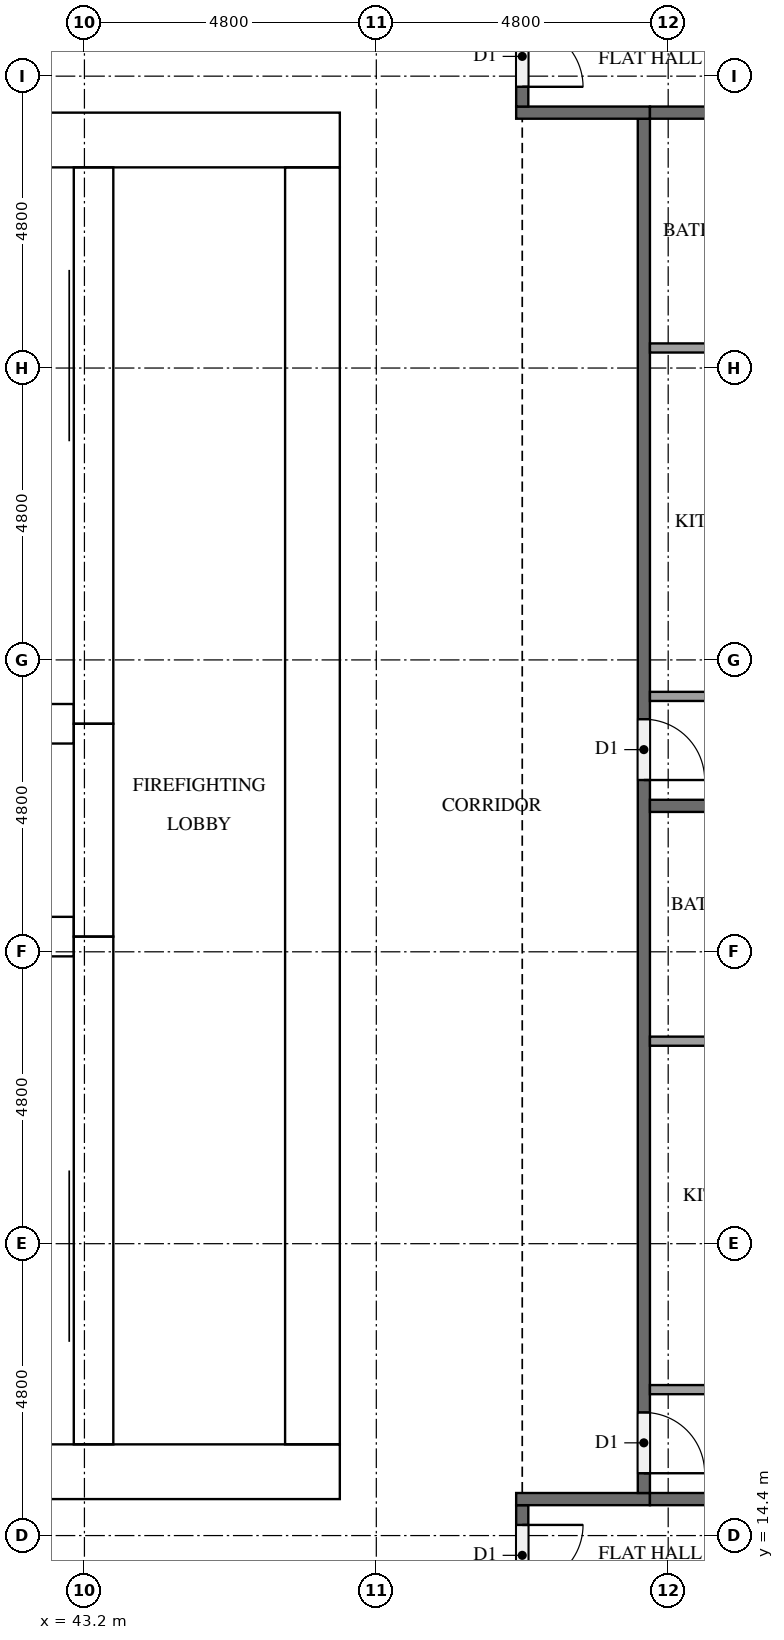
"""IFC4 building model, lengths in metres.
Left out: names, types, materials, properties, quantities, classifications, styles, units other than length and angle.
Written with IfcOpenShell. Run it as: python <this file> out.ifc"""

import sys

from ifc_helpers import new_model, si_unit, direction, frame, frame_2d, origin, place, context, subcontext, project, spatial, rectangle, extrude, element, fill, save


model = new_model("IFC4")
c1 = context("Model", 3, precision=1e-05, world=origin(), true_north=direction((0.0, 1.0)))
c2 = subcontext(c1, "Body", "Model", "MODEL_VIEW")
j1 = project(units=[si_unit("LENGTHUNIT", "METRE"), si_unit("PLANEANGLEUNIT", "RADIAN")], contexts=[c1])
p1 = place(None, origin())
s1 = spatial("IfcSite", under=j1, at=p1, CompositionType="ELEMENT")
p2 = place(p1, origin())
s2 = spatial("IfcBuilding", under=s1, at=p2, CompositionType="ELEMENT")
p3 = place(p2, frame((0.0, 0.0, 110.2)))
s3 = spatial("IfcBuildingStorey", under=s2, at=p3, CompositionType="ELEMENT", Elevation=110.2)
p4 = place(p3, frame((15.0, 15.45, 0.0), z_axis=(0.0, 0.0, 1.0), x_axis=(1.0, 0.0, 0.0)))
e1 = element("IfcWall", 1, at=p4, inside=s3, PredefinedType="SHEAR", context=c2, shape_type="SweptSolid", body=[
    extrude(rectangle(XDim=32.4, YDim=0.9, at=frame_2d((16.2, 0.0))), origin(), (0.0, 0.0, 1.0), 3.1),
])
p5 = place(p4, frame((15.3, 0.0, 0.0)))
e2 = element("IfcOpeningElement", 2, at=p5, cuts=e1, PredefinedType="OPENING", context=c2, shape_type="SweptSolid", body=[
    extrude(rectangle(XDim=1.8, YDim=2.1, at=frame_2d((0.9, 1.05))), frame((0.0, 0.46, 0.0), z_axis=(0.0, -1.0, 0.0), x_axis=(1.0, 0.0, 0.0)), (0.0, 0.0, 1.0), 0.92),
])
p6 = place(p3, frame((15.0, 37.35, 0.0), z_axis=(0.0, 0.0, 1.0), x_axis=(1.0, 0.0, 0.0)))
e3 = element("IfcWall", 3, at=p6, inside=s3, PredefinedType="SHEAR", context=c2, shape_type="SweptSolid", body=[
    extrude(rectangle(XDim=32.4, YDim=0.9, at=frame_2d((16.2, 0.0))), origin(), (0.0, 0.0, 1.0), 3.1),
])
p7 = place(p6, frame((15.3, 0.0, 0.0)))
e4 = element("IfcOpeningElement", 4, at=p7, cuts=e3, PredefinedType="OPENING", context=c2, shape_type="SweptSolid", body=[
    extrude(rectangle(XDim=1.8, YDim=2.1, at=frame_2d((0.9, 1.05))), frame((0.0, 0.46, 0.0), z_axis=(0.0, -1.0, 0.0), x_axis=(1.0, 0.0, 0.0)), (0.0, 0.0, 1.0), 0.92),
])
p8 = place(p6, frame((1.794, 0.0, 0.0)))
e5 = element("IfcOpeningElement", 5, at=p8, cuts=e3, PredefinedType="OPENING", context=c2, shape_type="SweptSolid", body=[
    extrude(rectangle(XDim=1.0, YDim=2.1, at=frame_2d((0.5, 1.05))), frame((0.0, 0.46, 0.0), z_axis=(0.0, -1.0, 0.0), x_axis=(1.0, 0.0, 0.0)), (0.0, 0.0, 1.0), 0.92),
])
p9 = place(p6, frame((5.331, 0.0, 0.0)))
e6 = element("IfcOpeningElement", 6, at=p9, cuts=e3, PredefinedType="OPENING", context=c2, shape_type="SweptSolid", body=[
    extrude(rectangle(XDim=1.0, YDim=2.1, at=frame_2d((0.5, 1.05))), frame((0.0, 0.46, 0.0), z_axis=(0.0, -1.0, 0.0), x_axis=(1.0, 0.0, 0.0)), (0.0, 0.0, 1.0), 0.92),
])
p10 = place(p3, frame((46.95, 15.9, 0.0), z_axis=(0.0, 0.0, 1.0), x_axis=(0.0, 1.0, 0.0)))
e7 = element("IfcWall", 7, at=p10, inside=s3, PredefinedType="SHEAR", context=c2, shape_type="SweptSolid", body=[
    extrude(rectangle(XDim=21.0, YDim=0.9, at=frame_2d((10.5, 0.0))), origin(), (0.0, 0.0, 1.0), 3.1),
])
p11 = place(p10, frame((10.2, 0.0, 0.0)))
e8 = element("IfcOpeningElement", 8, at=p11, cuts=e7, PredefinedType="OPENING", context=c2, shape_type="SweptSolid", body=[
    extrude(rectangle(XDim=1.2, YDim=2.1, at=frame_2d((0.6, 1.05))), frame((0.0, 0.46, 0.0), z_axis=(0.0, -1.0, 0.0), x_axis=(1.0, 0.0, 0.0)), (0.0, 0.0, 1.0), 0.92),
])
p12 = place(p3, frame((43.35, 15.9, 0.0), z_axis=(0.0, 0.0, 1.0), x_axis=(0.0, 1.0, 0.0)))
e9 = element("IfcWall", 9, at=p12, inside=s3, PredefinedType="SHEAR", context=c2, shape_type="SweptSolid", body=[
    extrude(rectangle(XDim=8.35, YDim=0.65, at=frame_2d((4.175, 0.0))), origin(), (0.0, 0.0, 1.0), 3.1),
])
p13 = place(p12, frame((0.3, 0.0, 0.0)))
e10 = element("IfcOpeningElement", 10, at=p13, cuts=e9, PredefinedType="OPENING", context=c2, shape_type="SweptSolid", body=[
    extrude(rectangle(XDim=1.2, YDim=2.1, at=frame_2d((0.6, 1.05))), frame((0.0, 0.335, 0.0), z_axis=(0.0, -1.0, 0.0), x_axis=(1.0, 0.0, 0.0)), (0.0, 0.0, 1.0), 0.67),
])
p14 = place(p3, frame((43.35, 24.25, 0.0), z_axis=(0.0, 0.0, 1.0), x_axis=(0.0, 1.0, 0.0)))
e11 = element("IfcWall", 11, at=p14, inside=s3, PredefinedType="SHEAR", context=c2, shape_type="SweptSolid", body=[
    extrude(rectangle(XDim=3.5, YDim=0.65, at=frame_2d((1.75, 0.0))), origin(), (0.0, 0.0, 1.0), 3.1),
])
p15 = place(p14, frame((1.2, 0.0, 0.0)))
e12 = element("IfcOpeningElement", 12, at=p15, cuts=e11, PredefinedType="OPENING", context=c2, shape_type="SweptSolid", body=[
    extrude(rectangle(XDim=1.1, YDim=2.1, at=frame_2d((0.55, 1.05))), frame((0.0, 0.335, 0.0), z_axis=(0.0, -1.0, 0.0), x_axis=(1.0, 0.0, 0.0)), (0.0, 0.0, 1.0), 0.67),
])
p16 = place(p3, frame((43.35, 27.75, 0.0), z_axis=(0.0, 0.0, 1.0), x_axis=(0.0, 1.0, 0.0)))
e13 = element("IfcWall", 13, at=p16, inside=s3, PredefinedType="SHEAR", context=c2, shape_type="SweptSolid", body=[
    extrude(rectangle(XDim=9.15, YDim=0.65, at=frame_2d((4.575, 0.0))), origin(), (0.0, 0.0, 1.0), 3.1),
])
p17 = place(p16, frame((7.65, 0.0, 0.0)))
e14 = element("IfcOpeningElement", 14, at=p17, cuts=e13, PredefinedType="OPENING", context=c2, shape_type="SweptSolid", body=[
    extrude(rectangle(XDim=1.2, YDim=2.1, at=frame_2d((0.6, 1.05))), frame((0.0, 0.335, 0.0), z_axis=(0.0, -1.0, 0.0), x_axis=(1.0, 0.0, 0.0)), (0.0, 0.0, 1.0), 0.67),
])
for number, where, z_axis, x_axis in (
    (15, (39.625, 24.25, 0.0), (0.0, 0.0, 1.0), (1.0, 0.0, 0.0)),
    (16, (39.625, 27.75, 0.0), (0.0, 0.0, 1.0), (1.0, 0.0, 0.0)),
):
    element("IfcWall", number, at=place(p3, frame(where, z_axis=z_axis, x_axis=x_axis)), inside=s3, PredefinedType="SHEAR", context=c2, shape_type="SweptSolid", body=[
        extrude(rectangle(XDim=3.4, YDim=0.65, at=frame_2d((1.7, 0.0))), origin(), (0.0, 0.0, 1.0), 3.1),
    ])
p18 = place(p3, frame((50.4, 14.9, 0.0), z_axis=(0.0, 0.0, 1.0), x_axis=(0.0, -1.0, 0.0)))
e17 = element("IfcWall", 17, at=p18, inside=s3, PredefinedType="PARTITIONING", context=c2, shape_type="SweptSolid", body=[
    extrude(rectangle(XDim=2.8, YDim=0.2, at=frame_2d((1.4, 0.0))), origin(), (0.0, 0.0, 1.0), 3.1),
])
p19 = place(p18, frame((0.325, 0.0, 0.0)))
e18 = element("IfcOpeningElement", 18, at=p19, cuts=e17, PredefinedType="OPENING", context=c2, shape_type="SweptSolid", body=[
    extrude(rectangle(XDim=1.0, YDim=2.1, at=frame_2d((0.5, 1.05))), frame((0.0, 0.11, 0.0), z_axis=(0.0, -1.0, 0.0), x_axis=(1.0, 0.0, 0.0)), (0.0, 0.0, 1.0), 0.22),
])
p20 = place(p3, frame((50.3, 15.0, 0.0), z_axis=(0.0, 0.0, 1.0), x_axis=(1.0, 0.0, 0.0)))
e19 = element("IfcWall", 19, at=p20, inside=s3, PredefinedType="PARTITIONING", context=c2, shape_type="SweptSolid", body=[
    extrude(rectangle(XDim=2.2, YDim=0.2, at=frame_2d((1.1, 0.0))), origin(), (0.0, 0.0, 1.0), 3.1),
])
p21 = place(p3, frame((52.4, 37.7, 0.0), z_axis=(0.0, 0.0, 1.0), x_axis=(0.0, -1.0, 0.0)))
e20 = element("IfcWall", 20, at=p21, inside=s3, PredefinedType="PARTITIONING", context=c2, shape_type="SweptSolid", body=[
    extrude(rectangle(XDim=22.6, YDim=0.2, at=frame_2d((11.3, 0.0))), origin(), (0.0, 0.0, 1.0), 3.1),
])
p22 = place(p21, frame((21.275, 0.0, 0.0)))
e21 = element("IfcOpeningElement", 21, at=p22, cuts=e20, PredefinedType="OPENING", context=c2, shape_type="SweptSolid", body=[
    extrude(rectangle(XDim=1.0, YDim=2.1, at=frame_2d((0.5, 1.05))), frame((0.0, 0.11, 0.0), z_axis=(0.0, -1.0, 0.0), x_axis=(1.0, 0.0, 0.0)), (0.0, 0.0, 1.0), 0.22),
])
p23 = place(p21, frame((9.875, 0.0, 0.0)))
e22 = element("IfcOpeningElement", 22, at=p23, cuts=e20, PredefinedType="OPENING", context=c2, shape_type="SweptSolid", body=[
    extrude(rectangle(XDim=1.0, YDim=2.1, at=frame_2d((0.5, 1.05))), frame((0.0, 0.11, 0.0), z_axis=(0.0, -1.0, 0.0), x_axis=(1.0, 0.0, 0.0)), (0.0, 0.0, 1.0), 0.22),
])
p24 = place(p3, frame((52.5, 37.8, 0.0), z_axis=(0.0, 0.0, 1.0), x_axis=(-1.0, 0.0, 0.0)))
e23 = element("IfcWall", 23, at=p24, inside=s3, PredefinedType="PARTITIONING", context=c2, shape_type="SweptSolid", body=[
    extrude(rectangle(XDim=2.2, YDim=0.2, at=frame_2d((1.1, 0.0))), origin(), (0.0, 0.0, 1.0), 3.1),
])
p25 = place(p3, frame((50.4, 40.7, 0.0), z_axis=(0.0, 0.0, 1.0), x_axis=(0.0, -1.0, 0.0)))
e24 = element("IfcWall", 24, at=p25, inside=s3, PredefinedType="PARTITIONING", context=c2, shape_type="SweptSolid", body=[
    extrude(rectangle(XDim=2.8, YDim=0.2, at=frame_2d((1.4, 0.0))), origin(), (0.0, 0.0, 1.0), 3.1),
])
p26 = place(p25, frame((1.475, 0.0, 0.0)))
e25 = element("IfcOpeningElement", 25, at=p26, cuts=e24, PredefinedType="OPENING", context=c2, shape_type="SweptSolid", body=[
    extrude(rectangle(XDim=1.0, YDim=2.1, at=frame_2d((0.5, 1.05))), frame((0.0, 0.11, 0.0), z_axis=(0.0, -1.0, 0.0), x_axis=(1.0, 0.0, 0.0)), (0.0, 0.0, 1.0), 0.22),
])
for number, where, z_axis, x_axis in (
    (26, (52.5, 15.0, 0.0), (0.0, 0.0, 1.0), (1.0, 0.0, 0.0)),
    (27, (52.5, 26.4, 0.0), (0.0, 0.0, 1.0), (1.0, 0.0, 0.0)),
):
    element("IfcWall", number, at=place(p3, frame(where, z_axis=z_axis, x_axis=x_axis)), inside=s3, PredefinedType="PARTITIONING", context=c2, shape_type="SweptSolid", body=[
        extrude(rectangle(XDim=9.8, YDim=0.2, at=frame_2d((4.9, 0.0))), origin(), (0.0, 0.0, 1.0), 3.1),
    ])
p27 = place(p3, frame((52.5, 37.8, 0.0), z_axis=(0.0, 0.0, 1.0), x_axis=(1.0, 0.0, 0.0)))
e28 = element("IfcWall", 28, at=p27, inside=s3, PredefinedType="PARTITIONING", context=c2, shape_type="SweptSolid", body=[
    extrude(rectangle(XDim=9.475, YDim=0.2, at=frame_2d((4.738, 0.0))), origin(), (0.0, 0.0, 1.0), 3.1),
])
p28 = place(p3, frame((52.5, 22.53, 0.0), z_axis=(0.0, 0.0, 1.0), x_axis=(1.0, 0.0, 0.0)))
e29 = element("IfcWall", 29, at=p28, inside=s3, PredefinedType="PARTITIONING", context=c2, shape_type="SweptSolid", body=[
    extrude(rectangle(XDim=2.475, YDim=0.15, at=frame_2d((1.238, 0.0))), origin(), (0.0, 0.0, 1.0), 3.1),
])
p29 = place(p3, frame((52.5, 16.8, 0.0), z_axis=(0.0, 0.0, 1.0), x_axis=(1.0, 0.0, 0.0)))
e30 = element("IfcWall", 30, at=p29, inside=s3, PredefinedType="PARTITIONING", context=c2, shape_type="SweptSolid", body=[
    extrude(rectangle(XDim=2.625, YDim=0.15, at=frame_2d((1.312, 0.0))), origin(), (0.0, 0.0, 1.0), 3.1),
])
p30 = place(p3, frame((52.5, 33.93, 0.0), z_axis=(0.0, 0.0, 1.0), x_axis=(1.0, 0.0, 0.0)))
e31 = element("IfcWall", 31, at=p30, inside=s3, PredefinedType="PARTITIONING", context=c2, shape_type="SweptSolid", body=[
    extrude(rectangle(XDim=2.925, YDim=0.15, at=frame_2d((1.462, 0.0))), origin(), (0.0, 0.0, 1.0), 3.1),
])
p31 = place(p3, frame((52.5, 28.2, 0.0), z_axis=(0.0, 0.0, 1.0), x_axis=(1.0, 0.0, 0.0)))
e32 = element("IfcWall", 32, at=p31, inside=s3, PredefinedType="PARTITIONING", context=c2, shape_type="SweptSolid", body=[
    extrude(rectangle(XDim=3.075, YDim=0.15, at=frame_2d((1.538, 0.0))), origin(), (0.0, 0.0, 1.0), 3.1),
])
p32 = place(p15, origin())
e33 = element("IfcDoor", 33, at=p32, inside=s3, OperationType="DOUBLE_DOOR_SLIDING", PredefinedType="DOOR", context=c2, shape_type="SweptSolid", body=[
    extrude(rectangle(XDim=1.1, YDim=2.1, at=frame_2d((0.55, 1.05))), frame((0.0, 0.025, 0.0), z_axis=(0.0, -1.0, 0.0), x_axis=(1.0, 0.0, 0.0)), (0.0, 0.0, 1.0), 0.05),
])
fill(e12, e33)
p33 = place(p13, origin())
e34 = element("IfcDoor", 34, at=p33, inside=s3, OperationType="SINGLE_SWING_LEFT", PredefinedType="DOOR", context=c2, shape_type="SweptSolid", body=[
    extrude(rectangle(XDim=1.2, YDim=2.1, at=frame_2d((0.6, 1.05))), frame((0.0, 0.025, 0.0), z_axis=(0.0, -1.0, 0.0), x_axis=(1.0, 0.0, 0.0)), (0.0, 0.0, 1.0), 0.05),
])
fill(e10, e34)
p34 = place(p17, origin())
e35 = element("IfcDoor", 35, at=p34, inside=s3, OperationType="SINGLE_SWING_RIGHT", PredefinedType="DOOR", context=c2, shape_type="SweptSolid", body=[
    extrude(rectangle(XDim=1.2, YDim=2.1, at=frame_2d((0.6, 1.05))), frame((0.0, 0.025, 0.0), z_axis=(0.0, -1.0, 0.0), x_axis=(1.0, 0.0, 0.0)), (0.0, 0.0, 1.0), 0.05),
])
fill(e14, e35)
p35 = place(p11, origin())
e36 = element("IfcDoor", 36, at=p35, inside=s3, OperationType="SINGLE_SWING_RIGHT", PredefinedType="DOOR", context=c2, shape_type="SweptSolid", body=[
    extrude(rectangle(XDim=1.2, YDim=2.1, at=frame_2d((0.6, 1.05))), frame((0.0, 0.025, 0.0), z_axis=(0.0, -1.0, 0.0), x_axis=(1.0, 0.0, 0.0)), (0.0, 0.0, 1.0), 0.05),
])
fill(e8, e36)
p36 = place(p19, origin())
e37 = element("IfcDoor", 37, at=p36, inside=s3, OperationType="SINGLE_SWING_LEFT", PredefinedType="DOOR", context=c2, shape_type="SweptSolid", body=[
    extrude(rectangle(XDim=1.0, YDim=2.1, at=frame_2d((0.5, 1.05))), frame((0.0, 0.025, 0.0), z_axis=(0.0, -1.0, 0.0), x_axis=(1.0, 0.0, 0.0)), (0.0, 0.0, 1.0), 0.05),
])
fill(e18, e37)
p37 = place(p22, origin())
e38 = element("IfcDoor", 38, at=p37, inside=s3, OperationType="SINGLE_SWING_RIGHT", PredefinedType="DOOR", context=c2, shape_type="SweptSolid", body=[
    extrude(rectangle(XDim=1.0, YDim=2.1, at=frame_2d((0.5, 1.05))), frame((0.0, 0.025, 0.0), z_axis=(0.0, -1.0, 0.0), x_axis=(1.0, 0.0, 0.0)), (0.0, 0.0, 1.0), 0.05),
])
fill(e21, e38)
p38 = place(p23, origin())
e39 = element("IfcDoor", 39, at=p38, inside=s3, OperationType="SINGLE_SWING_RIGHT", PredefinedType="DOOR", context=c2, shape_type="SweptSolid", body=[
    extrude(rectangle(XDim=1.0, YDim=2.1, at=frame_2d((0.5, 1.05))), frame((0.0, 0.025, 0.0), z_axis=(0.0, -1.0, 0.0), x_axis=(1.0, 0.0, 0.0)), (0.0, 0.0, 1.0), 0.05),
])
fill(e22, e39)
p39 = place(p26, origin())
e40 = element("IfcDoor", 40, at=p39, inside=s3, OperationType="SINGLE_SWING_RIGHT", PredefinedType="DOOR", context=c2, shape_type="SweptSolid", body=[
    extrude(rectangle(XDim=1.0, YDim=2.1, at=frame_2d((0.5, 1.05))), frame((0.0, 0.025, 0.0), z_axis=(0.0, -1.0, 0.0), x_axis=(1.0, 0.0, 0.0)), (0.0, 0.0, 1.0), 0.05),
])
fill(e25, e40)
save(model, sys.argv[1])
